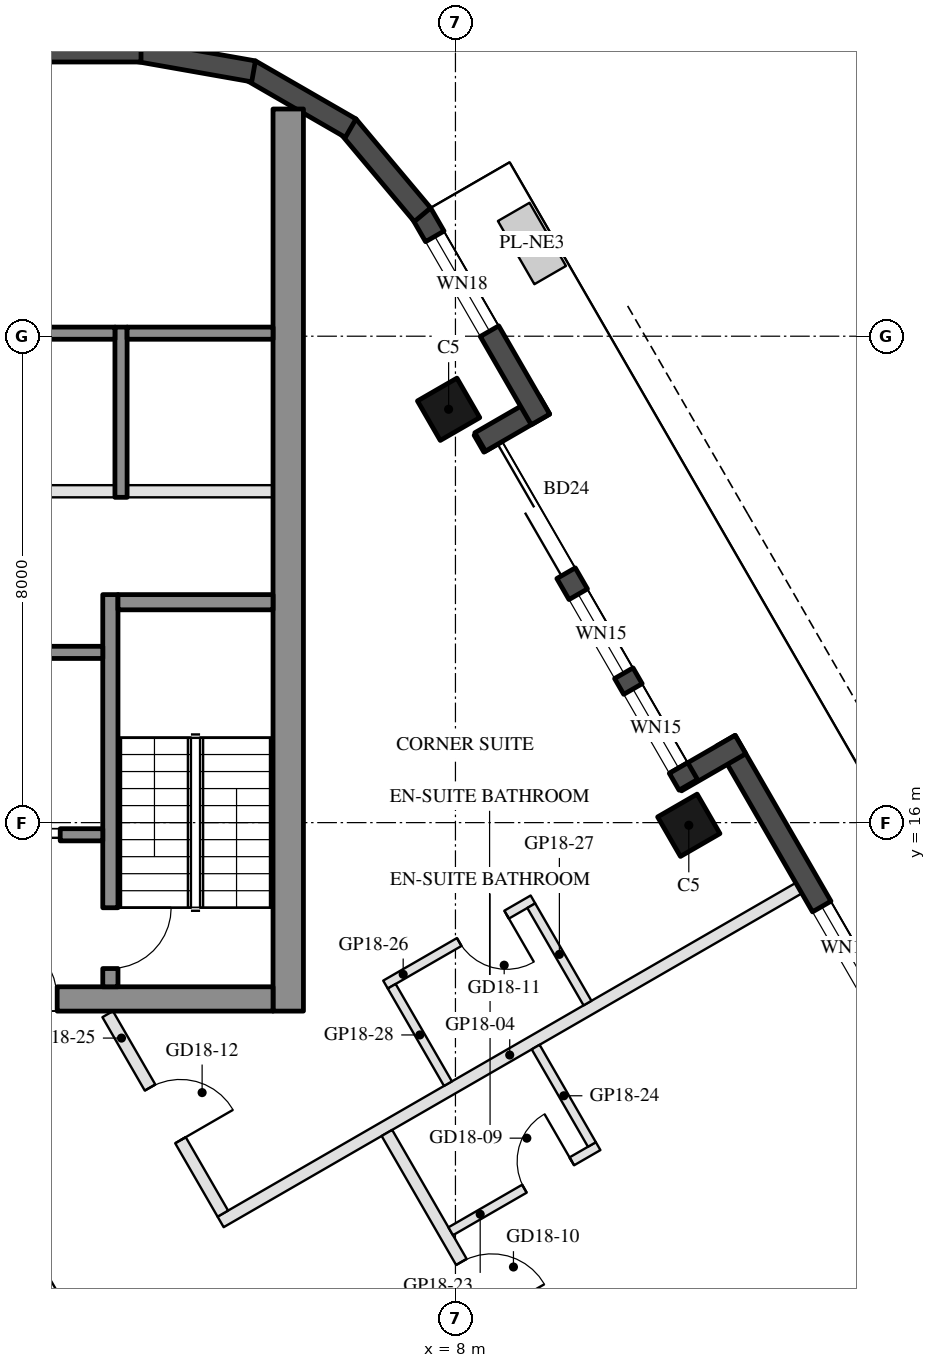
"""IFC4 building model, lengths in metres.
Left out: names, types, materials, properties, quantities, classifications, styles, units other than length and angle.
Written with IfcOpenShell. Run it as: python <this file> out.ifc"""

import sys

from ifc_helpers import new_model, si_unit, direction, frame, frame_2d, origin, origin_2d, place, context, subcontext, project, spatial, rectangle, hollow_rectangle, extrude, element, fill, save


model = new_model("IFC4")
c1 = context("Model", 3, precision=1e-05, world=origin(), true_north=direction((0.0, 1.0)))
c2 = subcontext(c1, "Body", "Model", "MODEL_VIEW")
j1 = project(units=[si_unit("LENGTHUNIT", "METRE"), si_unit("PLANEANGLEUNIT", "RADIAN")], contexts=[c1])
p1 = place(None, origin())
s1 = spatial("IfcSite", under=j1, at=p1, CompositionType="ELEMENT")
p2 = place(p1, origin())
s2 = spatial("IfcBuilding", under=s1, at=p2, CompositionType="ELEMENT")
p3 = place(p2, frame((0.0, 0.0, 191.0)))
s3 = spatial("IfcBuildingStorey", under=s2, at=p3, CompositionType="ELEMENT", Elevation=191.0)
for number, where, z_axis, x_axis in (
    (1, (11.838, 15.957, 0.0), (0.0, 0.0, 1.0), (-0.5, 0.866, 0.0)),
    (2, (7.888, 22.798, 0.0), (0.0, 0.0, 1.0), (-0.5, 0.866, 0.0)),
):
    element("IfcColumn", number, at=place(p3, frame(where, z_axis=z_axis, x_axis=x_axis)), inside=s3, PredefinedType="COLUMN", context=c2, shape_type="SweptSolid", body=[
        extrude(hollow_rectangle(XDim=0.75, YDim=0.75, WallThickness=0.035, at=origin_2d()), origin(), (0.0, 0.0, 1.0), 3.7),
    ])
p4 = place(p3, frame((17.299, 8.948, 0.0), z_axis=(0.0, 0.0, 1.0), x_axis=(-0.500010041276, 0.866019606374, 0.0)))
e3 = element("IfcWall", 3, at=p4, inside=s3, PredefinedType="SOLIDWALL", context=c2, shape_type="SweptSolid", body=[
    extrude(rectangle(XDim=9.7, YDim=0.35, at=frame_2d((4.85, 0.0))), origin(), (0.0, 0.0, 1.0), 3.55),
])
p5 = place(p4, frame((1.737, 0.0, 0.0)))
e4 = element("IfcOpeningElement", 4, at=p5, cuts=e3, PredefinedType="OPENING", context=c2, shape_type="SweptSolid", body=[
    extrude(rectangle(XDim=2.4, YDim=2.4, at=frame_2d((1.2, 1.2))), frame((0.0, 0.185, 0.0), z_axis=(0.0, -1.0, 0.0), x_axis=(1.0, 0.0, 0.0)), (0.0, 0.0, 1.0), 0.37),
])
p6 = place(p4, frame((4.949, 0.0, 0.3)))
e5 = element("IfcOpeningElement", 5, at=p6, cuts=e3, PredefinedType="OPENING", context=c2, shape_type="SweptSolid", body=[
    extrude(rectangle(XDim=1.6, YDim=2.65, at=frame_2d((0.8, 1.325))), frame((0.0, 0.185, 0.0), z_axis=(0.0, -1.0, 0.0), x_axis=(1.0, 0.0, 0.0)), (0.0, 0.0, 1.0), 0.37),
])
p7 = place(p3, frame((12.688, 17.284, 0.0), z_axis=(0.0, 0.0, 1.0), x_axis=(-0.865955602162, -0.500120880472, 0.0)))
e6 = element("IfcWall", 6, at=p7, inside=s3, PredefinedType="SOLIDWALL", context=c2, shape_type="SweptSolid", body=[
    extrude(rectangle(XDim=1.22, YDim=0.35, at=frame_2d((0.61, 0.0))), origin(), (0.0, 0.0, 1.0), 3.55),
])
p8 = place(p3, frame((11.829, 16.621, 0.0), z_axis=(0.0, 0.0, 1.0), x_axis=(-0.500003597184, 0.866023326939, 0.0)))
e7 = element("IfcWall", 7, at=p8, inside=s3, PredefinedType="SOLIDWALL", context=c2, shape_type="SweptSolid", body=[
    extrude(rectangle(XDim=6.74, YDim=0.35, at=frame_2d((3.37, 0.0))), origin(), (0.0, 0.0, 1.0), 3.55),
])
p9 = place(p8, frame((4.02, 0.0, 0.0)))
e8 = element("IfcOpeningElement", 8, at=p9, cuts=e7, PredefinedType="OPENING", context=c2, shape_type="SweptSolid", body=[
    extrude(rectangle(XDim=2.4, YDim=2.4, at=frame_2d((1.2, 1.2))), frame((0.0, 0.185, 0.0), z_axis=(0.0, -1.0, 0.0), x_axis=(1.0, 0.0, 0.0)), (0.0, 0.0, 1.0), 0.37),
])
p10 = place(p8, frame((0.32, 0.0, 0.3)))
e9 = element("IfcOpeningElement", 9, at=p10, cuts=e7, PredefinedType="OPENING", context=c2, shape_type="SweptSolid", body=[
    extrude(rectangle(XDim=1.5, YDim=2.65, at=frame_2d((0.75, 1.325))), frame((0.0, 0.185, 0.0), z_axis=(0.0, -1.0, 0.0), x_axis=(1.0, 0.0, 0.0)), (0.0, 0.0, 1.0), 0.37),
])
p11 = place(p8, frame((2.12, 0.0, 0.3)))
e10 = element("IfcOpeningElement", 10, at=p11, cuts=e7, PredefinedType="OPENING", context=c2, shape_type="SweptSolid", body=[
    extrude(rectangle(XDim=1.5, YDim=2.65, at=frame_2d((0.75, 1.325))), frame((0.0, 0.185, 0.0), z_axis=(0.0, -1.0, 0.0), x_axis=(1.0, 0.0, 0.0)), (0.0, 0.0, 1.0), 0.37),
])
p12 = place(p3, frame((8.406, 22.26, 0.0), z_axis=(0.0, 0.0, 1.0), x_axis=(0.865955602162, 0.500120880472, 0.0)))
e11 = element("IfcWall", 11, at=p12, inside=s3, PredefinedType="SOLIDWALL", context=c2, shape_type="SweptSolid", body=[
    extrude(rectangle(XDim=1.22, YDim=0.35, at=frame_2d((0.61, 0.0))), origin(), (0.0, 0.0, 1.0), 3.55),
])
p13 = place(p3, frame((9.398, 22.631, 0.0), z_axis=(0.0, 0.0, 1.0), x_axis=(-0.499954521343, 0.866051659307, 0.0)))
e12 = element("IfcWall", 12, at=p13, inside=s3, PredefinedType="SOLIDWALL", context=c2, shape_type="SweptSolid", body=[
    extrude(rectangle(XDim=3.916, YDim=0.35, at=frame_2d((1.958, 0.0))), origin(), (0.0, 0.0, 1.0), 3.55),
])
p14 = place(p13, frame((1.676, 0.0, 0.3)))
e13 = element("IfcOpeningElement", 13, at=p14, cuts=e12, PredefinedType="OPENING", context=c2, shape_type="SweptSolid", body=[
    extrude(rectangle(XDim=1.8, YDim=2.65, at=frame_2d((0.9, 1.325))), frame((0.0, 0.185, 0.0), z_axis=(0.0, -1.0, 0.0), x_axis=(1.0, 0.0, 0.0)), (0.0, 0.0, 1.0), 0.37),
])
p15 = place(p3, frame((7.458, 25.998, 0.0), z_axis=(0.0, 0.0, 1.0), x_axis=(-0.642808304945, 0.766027077259, 0.0)))
e14 = element("IfcWall", 14, at=p15, inside=s3, PredefinedType="SOLIDWALL", context=c2, shape_type="SweptSolid", body=[
    extrude(rectangle(XDim=1.91, YDim=0.35, at=frame_2d((0.955, 0.0))), origin(), (0.0, 0.0, 1.0), 3.55),
])
for number, where, z_axis, x_axis in (
    (15, (6.277, 27.422, 0.0), (0.0, 0.0, 1.0), (-0.866, 0.5, 0.0)),
    (16, (4.68, 28.356, 0.0), (0.0, 0.0, 1.0), (-0.985, 0.174, 0.0)),
):
    element("IfcWall", number, at=place(p3, frame(where, z_axis=z_axis, x_axis=x_axis)), inside=s3, PredefinedType="SOLIDWALL", context=c2, shape_type="SweptSolid", body=[
        extrude(rectangle(XDim=1.91, YDim=0.35, at=frame_2d((0.955, 0.0))), origin(), (0.0, 0.0, 1.0), 3.55),
    ])
p16 = place(p3, frame((2.829, 28.685, 0.0), z_axis=(0.0, 0.0, 1.0), x_axis=(-1.0, 0.0, 0.0)))
e17 = element("IfcWall", 17, at=p16, inside=s3, PredefinedType="SOLIDWALL", context=c2, shape_type="SweptSolid", body=[
    extrude(rectangle(XDim=5.658, YDim=0.35, at=frame_2d((2.829, 0.0))), origin(), (0.0, 0.0, 1.0), 3.55),
])
p17 = place(p3, frame((5.25, 12.9, 0.0), z_axis=(0.0, 0.0, 1.0), x_axis=(0.0, 1.0, 0.0)))
e18 = element("IfcWall", 18, at=p17, inside=s3, PredefinedType="SHEAR", context=c2, shape_type="SweptSolid", body=[
    extrude(rectangle(XDim=14.837, YDim=0.5, at=frame_2d((7.418, 0.0))), origin(), (0.0, 0.0, 1.0), 3.5),
])
p18 = place(p3, frame((5.0, 13.1, 0.0), z_axis=(0.0, 0.0, 1.0), x_axis=(-1.0, 0.0, 0.0)))
e19 = element("IfcWall", 19, at=p18, inside=s3, PredefinedType="SHEAR", context=c2, shape_type="SweptSolid", body=[
    extrude(rectangle(XDim=10.0, YDim=0.4, at=frame_2d((5.0, 0.0))), origin(), (0.0, 0.0, 1.0), 3.5),
])
p19 = place(p18, frame((3.55, 0.0, 0.0)))
e20 = element("IfcOpeningElement", 20, at=p19, cuts=e19, PredefinedType="OPENING", context=c2, shape_type="SweptSolid", body=[
    extrude(rectangle(XDim=1.1, YDim=2.1, at=frame_2d((0.55, 1.05))), frame((0.0, 0.21, 0.0), z_axis=(0.0, -1.0, 0.0), x_axis=(1.0, 0.0, 0.0)), (0.0, 0.0, 1.0), 0.42),
])
p20 = place(p18, frame((5.85, 0.0, 0.0)))
e21 = element("IfcOpeningElement", 21, at=p20, cuts=e19, PredefinedType="OPENING", context=c2, shape_type="SweptSolid", body=[
    extrude(rectangle(XDim=1.4, YDim=2.1, at=frame_2d((0.7, 1.05))), frame((0.0, 0.21, 0.0), z_axis=(0.0, -1.0, 0.0), x_axis=(1.0, 0.0, 0.0)), (0.0, 0.0, 1.0), 0.42),
])
p21 = place(p3, frame((2.325, 13.3, 0.0), z_axis=(0.0, 0.0, 1.0), x_axis=(0.0, 1.0, 0.0)))
e22 = element("IfcWall", 22, at=p21, inside=s3, PredefinedType="SHEAR", context=c2, shape_type="SweptSolid", body=[
    extrude(rectangle(XDim=6.45, YDim=0.25, at=frame_2d((3.225, 0.0))), origin(), (0.0, 0.0, 1.0), 3.5),
])
p22 = place(p21, frame((0.3, 0.0, 0.0)))
e23 = element("IfcOpeningElement", 23, at=p22, cuts=e22, PredefinedType="OPENING", context=c2, shape_type="SweptSolid", body=[
    extrude(rectangle(XDim=1.0, YDim=2.1, at=frame_2d((0.5, 1.05))), frame((0.0, 0.135, 0.0), z_axis=(0.0, -1.0, 0.0), x_axis=(1.0, 0.0, 0.0)), (0.0, 0.0, 1.0), 0.27),
])
p23 = place(p3, frame((5.0, 19.625, 0.0), z_axis=(0.0, 0.0, 1.0), x_axis=(-1.0, 0.0, 0.0)))
e24 = element("IfcWall", 24, at=p23, inside=s3, PredefinedType="SHEAR", context=c2, shape_type="SweptSolid", body=[
    extrude(rectangle(XDim=2.55, YDim=0.25, at=frame_2d((1.275, 0.0))), origin(), (0.0, 0.0, 1.0), 3.5),
])
p24 = place(p3, frame((2.2, 18.8, 0.0), z_axis=(0.0, 0.0, 1.0), x_axis=(-1.0, 0.0, 0.0)))
e25 = element("IfcWall", 25, at=p24, inside=s3, PredefinedType="SHEAR", context=c2, shape_type="SweptSolid", body=[
    extrude(rectangle(XDim=2.8, YDim=0.2, at=frame_2d((1.4, 0.0))), origin(), (0.0, 0.0, 1.0), 3.5),
])
p25 = place(p3, frame((2.2, 15.8, 0.0), z_axis=(0.0, 0.0, 1.0), x_axis=(-1.0, 0.0, 0.0)))
e26 = element("IfcWall", 26, at=p25, inside=s3, PredefinedType="SHEAR", context=c2, shape_type="SweptSolid", body=[
    extrude(rectangle(XDim=2.8, YDim=0.2, at=frame_2d((1.4, 0.0))), origin(), (0.0, 0.0, 1.0), 3.5),
])
p26 = place(p25, frame((0.7, 0.0, 0.0)))
e27 = element("IfcOpeningElement", 27, at=p26, cuts=e26, PredefinedType="OPENING", context=c2, shape_type="SweptSolid", body=[
    extrude(rectangle(XDim=1.2, YDim=2.1, at=frame_2d((0.6, 1.05))), frame((0.0, 0.11, 0.0), z_axis=(0.0, -1.0, 0.0), x_axis=(1.0, 0.0, 0.0)), (0.0, 0.0, 1.0), 0.22),
])
p27 = place(p3, frame((2.5, 21.35, 0.0), z_axis=(0.0, 0.0, 1.0), x_axis=(0.0, 1.0, 0.0)))
e28 = element("IfcWall", 28, at=p27, inside=s3, PredefinedType="SHEAR", context=c2, shape_type="SweptSolid", body=[
    extrude(rectangle(XDim=2.8, YDim=0.2, at=frame_2d((1.4, 0.0))), origin(), (0.0, 0.0, 1.0), 3.5),
])
p28 = place(p3, frame((5.0, 24.05, 0.0), z_axis=(0.0, 0.0, 1.0), x_axis=(-1.0, 0.0, 0.0)))
e29 = element("IfcWall", 29, at=p28, inside=s3, PredefinedType="SHEAR", context=c2, shape_type="SweptSolid", body=[
    extrude(rectangle(XDim=2.4, YDim=0.2, at=frame_2d((1.2, 0.0))), origin(), (0.0, 0.0, 1.0), 3.5),
])
p29 = place(p3, frame((2.4, 24.05, 0.0), z_axis=(0.0, 0.0, 1.0), x_axis=(-1.0, 0.0, 0.0)))
e30 = element("IfcWall", 30, at=p29, inside=s3, PredefinedType="SHEAR", context=c2, shape_type="SweptSolid", body=[
    extrude(rectangle(XDim=2.8, YDim=0.2, at=frame_2d((1.4, 0.0))), origin(), (0.0, 0.0, 1.0), 3.5),
])
p30 = place(p3, frame((5.0, 21.45, 0.0), z_axis=(0.0, 0.0, 1.0), x_axis=(-1.0, 0.0, 0.0)))
e31 = element("IfcWall", 31, at=p30, inside=s3, PredefinedType="PARTITIONING", context=c2, shape_type="SweptSolid", body=[
    extrude(rectangle(XDim=2.4, YDim=0.2, at=frame_2d((1.2, 0.0))), origin(), (0.0, 0.0, 1.0), 3.5),
])
p31 = place(p3, frame((2.4, 21.45, 0.0), z_axis=(0.0, 0.0, 1.0), x_axis=(-1.0, 0.0, 0.0)))
e32 = element("IfcWall", 32, at=p31, inside=s3, PredefinedType="PARTITIONING", context=c2, shape_type="SweptSolid", body=[
    extrude(rectangle(XDim=2.8, YDim=0.2, at=frame_2d((1.4, 0.0))), origin(), (0.0, 0.0, 1.0), 3.5),
])
p32 = place(p3, frame((13.647, 14.923, 0.0), z_axis=(0.0, 0.0, 1.0), x_axis=(-0.866027479907, -0.499996404033, 0.0)))
e33 = element("IfcWall", 33, at=p32, inside=s3, PredefinedType="PARTITIONING", context=c2, shape_type="SweptSolid", body=[
    extrude(rectangle(XDim=10.98, YDim=0.2, at=frame_2d((5.49, 0.0))), origin(), (0.0, 0.0, 1.0), 3.06),
])
p33 = place(p3, frame((6.873, 10.896, 0.0), z_axis=(0.0, 0.0, 1.0), x_axis=(0.499987518031, -0.866032610133, 0.0)))
e34 = element("IfcWall", 34, at=p33, inside=s3, PredefinedType="PARTITIONING", context=c2, shape_type="SweptSolid", body=[
    extrude(rectangle(XDim=9.886, YDim=0.2, at=frame_2d((4.943, 0.0))), origin(), (0.0, 0.0, 1.0), 2.95),
])
p34 = place(p33, frame((2.45, 0.0, 0.0)))
e35 = element("IfcOpeningElement", 35, at=p34, cuts=e34, PredefinedType="OPENING", context=c2, shape_type="SweptSolid", body=[
    extrude(rectangle(XDim=1.0, YDim=2.1, at=frame_2d((0.5, 1.05))), frame((0.0, 0.11, 0.0), z_axis=(0.0, -1.0, 0.0), x_axis=(1.0, 0.0, 0.0)), (0.0, 0.0, 1.0), 0.22),
])
p35 = place(p3, frame((7.922, 9.279, 0.0), z_axis=(0.0, 0.0, 1.0), x_axis=(0.865996816683, 0.500049511043, 0.0)))
e36 = element("IfcWall", 36, at=p35, inside=s3, PredefinedType="PARTITIONING", context=c2, shape_type="SweptSolid", body=[
    extrude(rectangle(XDim=2.8, YDim=0.15, at=frame_2d((1.4, 0.0))), origin(), (0.0, 0.0, 1.0), 2.95),
])
p36 = place(p35, frame((1.4, 0.0, 0.0)))
e37 = element("IfcOpeningElement", 37, at=p36, cuts=e36, PredefinedType="OPENING", context=c2, shape_type="SweptSolid", body=[
    extrude(rectangle(XDim=0.9, YDim=2.1, at=frame_2d((0.45, 1.05))), frame((0.0, 0.085, 0.0), z_axis=(0.0, -1.0, 0.0), x_axis=(1.0, 0.0, 0.0)), (0.0, 0.0, 1.0), 0.17),
])
p37 = place(p3, frame((10.244, 10.707, 0.0), z_axis=(0.0, 0.0, 1.0), x_axis=(-0.500042316284, 0.866000971088, 0.0)))
e38 = element("IfcWall", 38, at=p37, inside=s3, PredefinedType="PARTITIONING", context=c2, shape_type="SweptSolid", body=[
    extrude(rectangle(XDim=1.85, YDim=0.15, at=frame_2d((0.925, 0.0))), origin(), (0.0, 0.0, 1.0), 3.55),
])
p38 = place(p3, frame((2.281, 12.85, 0.0), z_axis=(0.0, 0.0, 1.0), x_axis=(0.499979074716, -0.866037484666, 0.0)))
e39 = element("IfcWall", 39, at=p38, inside=s3, PredefinedType="PARTITIONING", context=c2, shape_type="SweptSolid", body=[
    extrude(rectangle(XDim=3.788, YDim=0.2, at=frame_2d((1.894, 0.0))), origin(), (0.0, 0.0, 1.0), 2.95),
])
p39 = place(p38, frame((1.394, 0.0, 0.0)))
e40 = element("IfcOpeningElement", 40, at=p39, cuts=e39, PredefinedType="OPENING", context=c2, shape_type="SweptSolid", body=[
    extrude(rectangle(XDim=1.0, YDim=2.1, at=frame_2d((0.5, 1.05))), frame((0.0, 0.11, 0.0), z_axis=(0.0, -1.0, 0.0), x_axis=(1.0, 0.0, 0.0)), (0.0, 0.0, 1.0), 0.22),
])
p40 = place(p3, frame((9.274, 14.737, 0.0), z_axis=(0.0, 0.0, 1.0), x_axis=(-0.866018616679, -0.500011755427, 0.0)))
e41 = element("IfcWall", 41, at=p40, inside=s3, PredefinedType="PARTITIONING", context=c2, shape_type="SweptSolid", body=[
    extrude(rectangle(XDim=2.8, YDim=0.15, at=frame_2d((1.4, 0.0))), origin(), (0.0, 0.0, 1.0), 3.55),
])
p41 = place(p40, frame((0.5, 0.0, 0.0)))
e42 = element("IfcOpeningElement", 42, at=p41, cuts=e41, PredefinedType="OPENING", context=c2, shape_type="SweptSolid", body=[
    extrude(rectangle(XDim=0.9, YDim=2.1, at=frame_2d((0.45, 1.05))), frame((0.0, 0.085, 0.0), z_axis=(0.0, -1.0, 0.0), x_axis=(1.0, 0.0, 0.0)), (0.0, 0.0, 1.0), 0.17),
])
p42 = place(p3, frame((10.172, 13.032, 0.0), z_axis=(0.0, 0.0, 1.0), x_axis=(-0.500042316284, 0.866000971088, 0.0)))
e43 = element("IfcWall", 43, at=p42, inside=s3, PredefinedType="PARTITIONING", context=c2, shape_type="SweptSolid", body=[
    extrude(rectangle(XDim=1.85, YDim=0.15, at=frame_2d((0.925, 0.0))), origin(), (0.0, 0.0, 1.0), 2.95),
])
p43 = place(p3, frame((7.877, 11.707, 0.0), z_axis=(0.0, 0.0, 1.0), x_axis=(-0.499985172903, 0.866033964044, 0.0)))
e44 = element("IfcWall", 44, at=p43, inside=s3, PredefinedType="PARTITIONING", context=c2, shape_type="SweptSolid", body=[
    extrude(rectangle(XDim=1.85, YDim=0.15, at=frame_2d((0.925, 0.0))), origin(), (0.0, 0.0, 1.0), 2.95),
])
p44 = place(p6, origin())
e45 = element("IfcWindow", 45, at=p44, inside=s3, PartitioningType="SINGLE_PANEL", PredefinedType="WINDOW", context=c2, shape_type="SweptSolid", body=[
    extrude(rectangle(XDim=1.6, YDim=2.65, at=frame_2d((0.8, 1.325))), frame((0.0, 0.03, 0.0), z_axis=(0.0, -1.0, 0.0), x_axis=(1.0, 0.0, 0.0)), (0.0, 0.0, 1.0), 0.06),
])
fill(e5, e45)
p45 = place(p9, frame((2.4, 0.0, 0.0), z_axis=(0.0, 0.0, 1.0), x_axis=(-1.0, 0.0, 0.0)))
e46 = element("IfcDoor", 46, at=p45, inside=s3, OperationType="SLIDING_TO_LEFT", PredefinedType="DOOR", context=c2, shape_type="SweptSolid", body=[
    extrude(rectangle(XDim=2.4, YDim=2.4, at=frame_2d((1.2, 1.2))), frame((0.0, 0.025, 0.0), z_axis=(0.0, -1.0, 0.0), x_axis=(1.0, 0.0, 0.0)), (0.0, 0.0, 1.0), 0.05),
])
fill(e8, e46)
p46 = place(p10, origin())
e47 = element("IfcWindow", 47, at=p46, inside=s3, PartitioningType="SINGLE_PANEL", PredefinedType="WINDOW", context=c2, shape_type="SweptSolid", body=[
    extrude(rectangle(XDim=1.5, YDim=2.65, at=frame_2d((0.75, 1.325))), frame((0.0, 0.03, 0.0), z_axis=(0.0, -1.0, 0.0), x_axis=(1.0, 0.0, 0.0)), (0.0, 0.0, 1.0), 0.06),
])
fill(e9, e47)
p47 = place(p11, origin())
e48 = element("IfcWindow", 48, at=p47, inside=s3, PartitioningType="SINGLE_PANEL", PredefinedType="WINDOW", context=c2, shape_type="SweptSolid", body=[
    extrude(rectangle(XDim=1.5, YDim=2.65, at=frame_2d((0.75, 1.325))), frame((0.0, 0.03, 0.0), z_axis=(0.0, -1.0, 0.0), x_axis=(1.0, 0.0, 0.0)), (0.0, 0.0, 1.0), 0.06),
])
fill(e10, e48)
p48 = place(p14, origin())
e49 = element("IfcWindow", 49, at=p48, inside=s3, PartitioningType="SINGLE_PANEL", PredefinedType="WINDOW", context=c2, shape_type="SweptSolid", body=[
    extrude(rectangle(XDim=1.8, YDim=2.65, at=frame_2d((0.9, 1.325))), frame((0.0, 0.03, 0.0), z_axis=(0.0, -1.0, 0.0), x_axis=(1.0, 0.0, 0.0)), (0.0, 0.0, 1.0), 0.06),
])
fill(e13, e49)
p49 = place(p26, origin())
e50 = element("IfcDoor", 50, at=p49, inside=s3, OperationType="DOUBLE_DOOR_SLIDING", PredefinedType="DOOR", context=c2, shape_type="SweptSolid", body=[
    extrude(rectangle(XDim=1.2, YDim=2.1, at=frame_2d((0.6, 1.05))), frame((0.0, 0.025, 0.0), z_axis=(0.0, -1.0, 0.0), x_axis=(1.0, 0.0, 0.0)), (0.0, 0.0, 1.0), 0.05),
])
fill(e27, e50)
p50 = place(p19, frame((1.1, 0.0, 0.0), z_axis=(0.0, 0.0, 1.0), x_axis=(-1.0, 0.0, 0.0)))
e51 = element("IfcDoor", 51, at=p50, inside=s3, OperationType="SINGLE_SWING_LEFT", PredefinedType="DOOR", context=c2, shape_type="SweptSolid", body=[
    extrude(rectangle(XDim=1.1, YDim=2.1, at=frame_2d((0.55, 1.05))), frame((0.0, 0.025, 0.0), z_axis=(0.0, -1.0, 0.0), x_axis=(1.0, 0.0, 0.0)), (0.0, 0.0, 1.0), 0.05),
])
fill(e20, e51)
p51 = place(p22, frame((1.0, 0.0, 0.0), z_axis=(0.0, 0.0, 1.0), x_axis=(-1.0, 0.0, 0.0)))
e52 = element("IfcDoor", 52, at=p51, inside=s3, OperationType="SINGLE_SWING_LEFT", PredefinedType="DOOR", context=c2, shape_type="SweptSolid", body=[
    extrude(rectangle(XDim=1.0, YDim=2.1, at=frame_2d((0.5, 1.05))), frame((0.0, 0.025, 0.0), z_axis=(0.0, -1.0, 0.0), x_axis=(1.0, 0.0, 0.0)), (0.0, 0.0, 1.0), 0.05),
])
fill(e23, e52)
p52 = place(p36, origin())
e53 = element("IfcDoor", 53, at=p52, inside=s3, OperationType="SINGLE_SWING_RIGHT", PredefinedType="DOOR", context=c2, shape_type="SweptSolid", body=[
    extrude(rectangle(XDim=0.9, YDim=2.1, at=frame_2d((0.45, 1.05))), frame((0.0, 0.025, 0.0), z_axis=(0.0, -1.0, 0.0), x_axis=(1.0, 0.0, 0.0)), (0.0, 0.0, 1.0), 0.05),
])
fill(e37, e53)
p53 = place(p34, origin())
e54 = element("IfcDoor", 54, at=p53, inside=s3, OperationType="SINGLE_SWING_RIGHT", PredefinedType="DOOR", context=c2, shape_type="SweptSolid", body=[
    extrude(rectangle(XDim=1.0, YDim=2.1, at=frame_2d((0.5, 1.05))), frame((0.0, 0.025, 0.0), z_axis=(0.0, -1.0, 0.0), x_axis=(1.0, 0.0, 0.0)), (0.0, 0.0, 1.0), 0.05),
])
fill(e35, e54)
p54 = place(p41, origin())
e55 = element("IfcDoor", 55, at=p54, inside=s3, OperationType="SINGLE_SWING_LEFT", PredefinedType="DOOR", context=c2, shape_type="SweptSolid", body=[
    extrude(rectangle(XDim=0.9, YDim=2.1, at=frame_2d((0.45, 1.05))), frame((0.0, 0.025, 0.0), z_axis=(0.0, -1.0, 0.0), x_axis=(1.0, 0.0, 0.0)), (0.0, 0.0, 1.0), 0.05),
])
fill(e42, e55)
p55 = place(p39, origin())
e56 = element("IfcDoor", 56, at=p55, inside=s3, OperationType="SINGLE_SWING_RIGHT", PredefinedType="DOOR", context=c2, shape_type="SweptSolid", body=[
    extrude(rectangle(XDim=1.0, YDim=2.1, at=frame_2d((0.5, 1.05))), frame((0.0, 0.025, 0.0), z_axis=(0.0, -1.0, 0.0), x_axis=(1.0, 0.0, 0.0)), (0.0, 0.0, 1.0), 0.05),
])
fill(e40, e56)
save(model, sys.argv[1])
